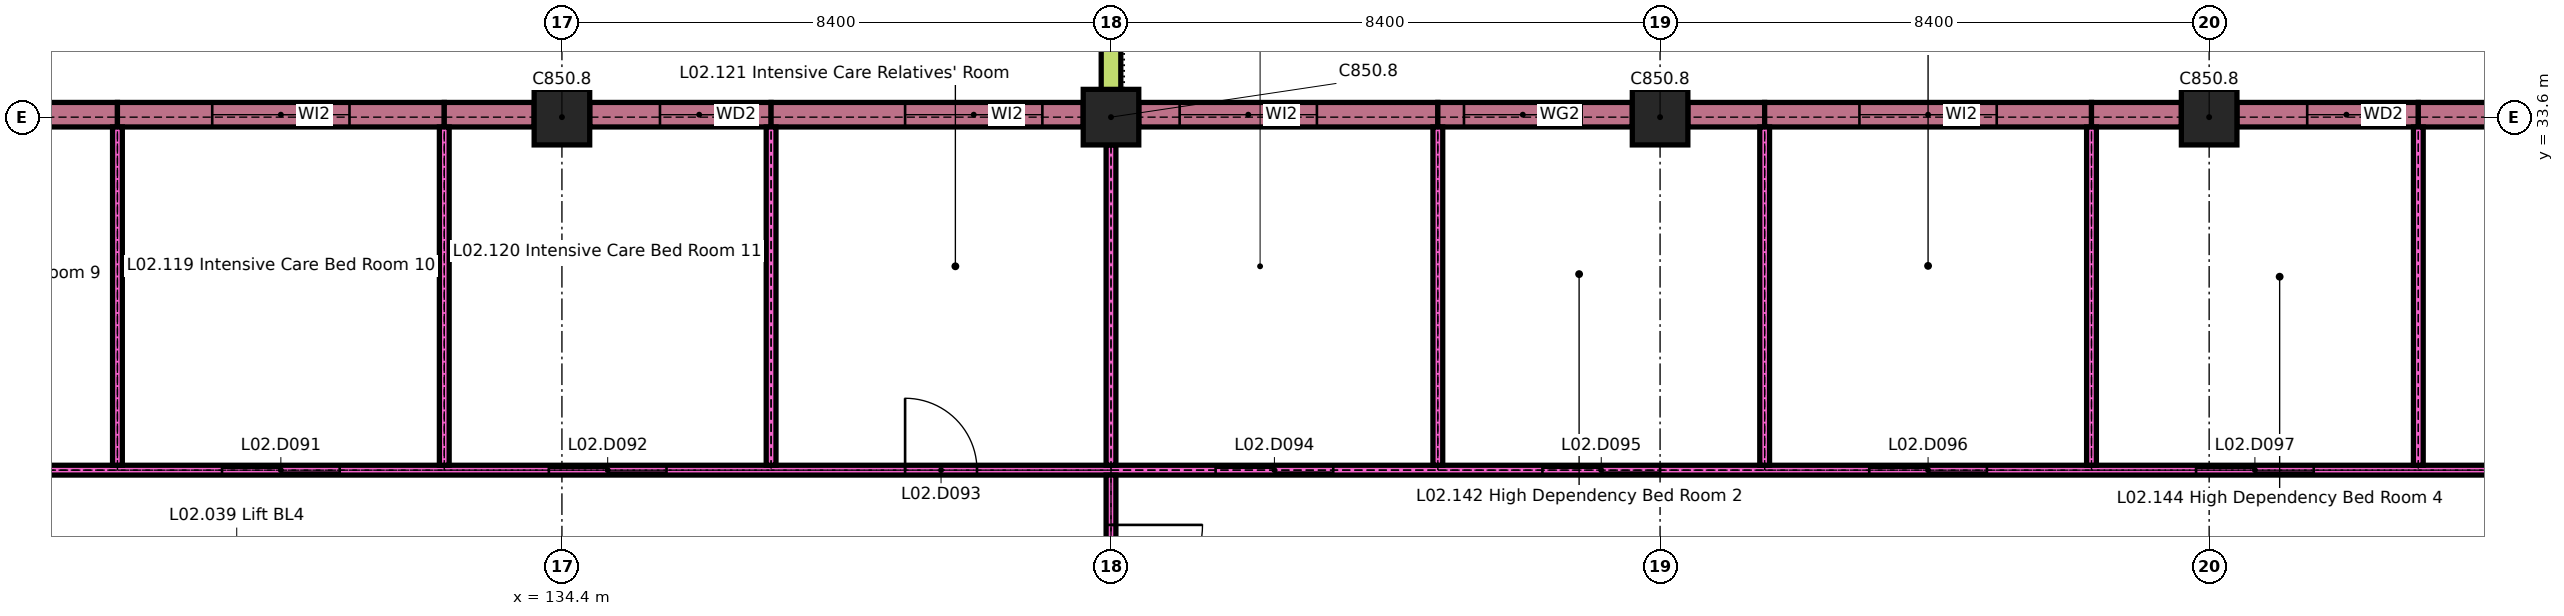
"""IFC4 building model, lengths in metres.
Left out: names, types, materials, properties, quantities, classifications, styles, units other than length and angle.
Written with IfcOpenShell. Run it as: python <this file> out.ifc"""

import sys

from ifc_helpers import new_model, si_unit, direction, frame, frame_2d, origin, origin_2d, place, context, subcontext, project, spatial, rectangle, extrude, element, fill, save


model = new_model("IFC4")
c1 = context("Model", 3, precision=1e-05, world=origin(), true_north=direction((0.0, 1.0)))
c2 = subcontext(c1, "Body", "Model", "MODEL_VIEW")
j1 = project(units=[si_unit("LENGTHUNIT", "METRE"), si_unit("PLANEANGLEUNIT", "RADIAN")], contexts=[c1])
p1 = place(None, origin())
s1 = spatial("IfcSite", under=j1, at=p1, CompositionType="ELEMENT")
p2 = place(p1, origin())
s2 = spatial("IfcBuilding", under=s1, at=p2, CompositionType="ELEMENT")
p3 = place(p2, frame((0.0, 0.0, 8.4)))
s3 = spatial("IfcBuildingStorey", under=s2, at=p3, CompositionType="ELEMENT", Elevation=8.4)
for number, where, z_axis, x_axis in (
    (1, (134.4, 33.6, 0.0), (0.0, 0.0, 1.0), (1.0, 0.0, 0.0)),
    (2, (142.8, 33.6, 0.0), (0.0, 0.0, 1.0), (1.0, 0.0, 0.0)),
    (3, (151.2, 33.6, 0.0), (0.0, 0.0, 1.0), (1.0, 0.0, 0.0)),
    (4, (159.6, 33.6, 0.0), (0.0, 0.0, 1.0), (1.0, 0.0, 0.0)),
):
    element("IfcColumn", number, at=place(p3, frame(where, z_axis=z_axis, x_axis=x_axis)), inside=s3, PredefinedType="COLUMN", context=c2, shape_type="SweptSolid", body=[
        extrude(rectangle(XDim=0.85, YDim=0.85, at=origin_2d()), origin(), (0.0, 0.0, 1.0), 4.2),
    ])
p4 = place(p3, frame((126.425, 33.637, 0.0), z_axis=(0.0, 0.0, 1.0), x_axis=(1.0, 0.0, 0.0)))
e5 = element("IfcWall", 5, at=p4, inside=s3, PredefinedType="SOLIDWALL", context=c2, shape_type="SweptSolid", body=[
    extrude(rectangle(XDim=1.175, YDim=0.375, at=frame_2d((0.587, 0.0))), origin(), (0.0, 0.0, 1.0), 3.9),
])
p5 = place(p3, frame((127.6, 33.637, 0.0), z_axis=(0.0, 0.0, 1.0), x_axis=(1.0, 0.0, 0.0)))
e6 = element("IfcWall", 6, at=p5, inside=s3, PredefinedType="SOLIDWALL", context=c2, shape_type="SweptSolid", body=[
    extrude(rectangle(XDim=5.0, YDim=0.375, at=frame_2d((2.5, 0.0))), origin(), (0.0, 0.0, 1.0), 3.9),
])
p6 = place(p5, frame((1.45, 0.0, 0.9)))
e7 = element("IfcOpeningElement", 7, at=p6, cuts=e6, PredefinedType="OPENING", context=c2, shape_type="SweptSolid", body=[
    extrude(rectangle(XDim=2.1, YDim=2.1, at=frame_2d((1.05, 1.05))), frame((0.0, 0.198, 0.0), z_axis=(0.0, -1.0, 0.0), x_axis=(1.0, 0.0, 0.0)), (0.0, 0.0, 1.0), 0.395),
])
p7 = place(p3, frame((132.6, 33.637, 0.0), z_axis=(0.0, 0.0, 1.0), x_axis=(1.0, 0.0, 0.0)))
e8 = element("IfcWall", 8, at=p7, inside=s3, PredefinedType="SOLIDWALL", context=c2, shape_type="SweptSolid", body=[
    extrude(rectangle(XDim=1.375, YDim=0.375, at=frame_2d((0.688, 0.0))), origin(), (0.0, 0.0, 1.0), 3.9),
])
p8 = place(p3, frame((134.825, 33.637, 0.0), z_axis=(0.0, 0.0, 1.0), x_axis=(1.0, 0.0, 0.0)))
e9 = element("IfcWall", 9, at=p8, inside=s3, PredefinedType="SOLIDWALL", context=c2, shape_type="SweptSolid", body=[
    extrude(rectangle(XDim=2.775, YDim=0.375, at=frame_2d((1.388, 0.0))), origin(), (0.0, 0.0, 1.0), 3.9),
])
p9 = place(p8, frame((1.075, 0.0, 0.9)))
e10 = element("IfcOpeningElement", 10, at=p9, cuts=e9, PredefinedType="OPENING", context=c2, shape_type="SweptSolid", body=[
    extrude(rectangle(XDim=1.2, YDim=2.1, at=frame_2d((0.6, 1.05))), frame((0.0, 0.198, 0.0), z_axis=(0.0, -1.0, 0.0), x_axis=(1.0, 0.0, 0.0)), (0.0, 0.0, 1.0), 0.395),
])
p10 = place(p3, frame((137.6, 33.637, 0.0), z_axis=(0.0, 0.0, 1.0), x_axis=(1.0, 0.0, 0.0)))
e11 = element("IfcWall", 11, at=p10, inside=s3, PredefinedType="SOLIDWALL", context=c2, shape_type="SweptSolid", body=[
    extrude(rectangle(XDim=4.775, YDim=0.375, at=frame_2d((2.387, 0.0))), origin(), (0.0, 0.0, 1.0), 3.9),
])
p11 = place(p10, frame((2.05, 0.0, 0.9)))
e12 = element("IfcOpeningElement", 12, at=p11, cuts=e11, PredefinedType="OPENING", context=c2, shape_type="SweptSolid", body=[
    extrude(rectangle(XDim=2.1, YDim=2.1, at=frame_2d((1.05, 1.05))), frame((0.0, 0.198, 0.0), z_axis=(0.0, -1.0, 0.0), x_axis=(1.0, 0.0, 0.0)), (0.0, 0.0, 1.0), 0.395),
])
p12 = place(p3, frame((143.225, 33.637, 0.0), z_axis=(0.0, 0.0, 1.0), x_axis=(1.0, 0.0, 0.0)))
e13 = element("IfcWall", 13, at=p12, inside=s3, PredefinedType="SOLIDWALL", context=c2, shape_type="SweptSolid", body=[
    extrude(rectangle(XDim=4.575, YDim=0.375, at=frame_2d((2.288, 0.0))), origin(), (0.0, 0.0, 1.0), 3.9),
])
p13 = place(p12, frame((0.625, 0.0, 0.9)))
e14 = element("IfcOpeningElement", 14, at=p13, cuts=e13, PredefinedType="OPENING", context=c2, shape_type="SweptSolid", body=[
    extrude(rectangle(XDim=2.1, YDim=2.1, at=frame_2d((1.05, 1.05))), frame((0.0, 0.198, 0.0), z_axis=(0.0, -1.0, 0.0), x_axis=(1.0, 0.0, 0.0)), (0.0, 0.0, 1.0), 0.395),
])
p14 = place(p3, frame((147.8, 33.637, 0.0), z_axis=(0.0, 0.0, 1.0), x_axis=(1.0, 0.0, 0.0)))
e15 = element("IfcWall", 15, at=p14, inside=s3, PredefinedType="SOLIDWALL", context=c2, shape_type="SweptSolid", body=[
    extrude(rectangle(XDim=2.975, YDim=0.375, at=frame_2d((1.487, 0.0))), origin(), (0.0, 0.0, 1.0), 3.9),
])
p15 = place(p14, frame((0.4, 0.0, 0.9)))
e16 = element("IfcOpeningElement", 16, at=p15, cuts=e15, PredefinedType="OPENING", context=c2, shape_type="SweptSolid", body=[
    extrude(rectangle(XDim=1.8, YDim=2.1, at=frame_2d((0.9, 1.05))), frame((0.0, 0.198, 0.0), z_axis=(0.0, -1.0, 0.0), x_axis=(1.0, 0.0, 0.0)), (0.0, 0.0, 1.0), 0.395),
])
p16 = place(p3, frame((151.625, 33.637, 0.0), z_axis=(0.0, 0.0, 1.0), x_axis=(1.0, 0.0, 0.0)))
e17 = element("IfcWall", 17, at=p16, inside=s3, PredefinedType="SOLIDWALL", context=c2, shape_type="SweptSolid", body=[
    extrude(rectangle(XDim=1.175, YDim=0.375, at=frame_2d((0.587, 0.0))), origin(), (0.0, 0.0, 1.0), 3.9),
])
p17 = place(p3, frame((152.8, 33.637, 0.0), z_axis=(0.0, 0.0, 1.0), x_axis=(1.0, 0.0, 0.0)))
e18 = element("IfcWall", 18, at=p17, inside=s3, PredefinedType="SOLIDWALL", context=c2, shape_type="SweptSolid", body=[
    extrude(rectangle(XDim=5.0, YDim=0.375, at=frame_2d((2.5, 0.0))), origin(), (0.0, 0.0, 1.0), 3.9),
])
p18 = place(p17, frame((1.45, 0.0, 0.9)))
e19 = element("IfcOpeningElement", 19, at=p18, cuts=e18, PredefinedType="OPENING", context=c2, shape_type="SweptSolid", body=[
    extrude(rectangle(XDim=2.1, YDim=2.1, at=frame_2d((1.05, 1.05))), frame((0.0, 0.198, 0.0), z_axis=(0.0, -1.0, 0.0), x_axis=(1.0, 0.0, 0.0)), (0.0, 0.0, 1.0), 0.395),
])
p19 = place(p3, frame((157.8, 33.637, 0.0), z_axis=(0.0, 0.0, 1.0), x_axis=(1.0, 0.0, 0.0)))
e20 = element("IfcWall", 20, at=p19, inside=s3, PredefinedType="SOLIDWALL", context=c2, shape_type="SweptSolid", body=[
    extrude(rectangle(XDim=1.375, YDim=0.375, at=frame_2d((0.688, 0.0))), origin(), (0.0, 0.0, 1.0), 3.9),
])
p20 = place(p3, frame((160.025, 33.637, 0.0), z_axis=(0.0, 0.0, 1.0), x_axis=(1.0, 0.0, 0.0)))
e21 = element("IfcWall", 21, at=p20, inside=s3, PredefinedType="SOLIDWALL", context=c2, shape_type="SweptSolid", body=[
    extrude(rectangle(XDim=2.775, YDim=0.375, at=frame_2d((1.388, 0.0))), origin(), (0.0, 0.0, 1.0), 3.9),
])
p21 = place(p20, frame((1.075, 0.0, 0.9)))
e22 = element("IfcOpeningElement", 22, at=p21, cuts=e21, PredefinedType="OPENING", context=c2, shape_type="SweptSolid", body=[
    extrude(rectangle(XDim=1.2, YDim=2.1, at=frame_2d((0.6, 1.05))), frame((0.0, 0.198, 0.0), z_axis=(0.0, -1.0, 0.0), x_axis=(1.0, 0.0, 0.0)), (0.0, 0.0, 1.0), 0.395),
])
p22 = place(p3, frame((162.8, 33.637, 0.0), z_axis=(0.0, 0.0, 1.0), x_axis=(1.0, 0.0, 0.0)))
e23 = element("IfcWall", 23, at=p22, inside=s3, PredefinedType="SOLIDWALL", context=c2, shape_type="SweptSolid", body=[
    extrude(rectangle(XDim=4.775, YDim=0.375, at=frame_2d((2.387, 0.0))), origin(), (0.0, 0.0, 1.0), 3.9),
])
p23 = place(p22, frame((2.05, 0.0, 0.9)))
e24 = element("IfcOpeningElement", 24, at=p23, cuts=e23, PredefinedType="OPENING", context=c2, shape_type="SweptSolid", body=[
    extrude(rectangle(XDim=2.1, YDim=2.1, at=frame_2d((1.05, 1.05))), frame((0.0, 0.198, 0.0), z_axis=(0.0, -1.0, 0.0), x_axis=(1.0, 0.0, 0.0)), (0.0, 0.0, 1.0), 0.395),
])
p24 = place(p3, frame((142.8, 75.3, 0.0), z_axis=(0.0, 0.0, 1.0), x_axis=(0.0, -1.0, 0.0)))
e25 = element("IfcWall", 25, at=p24, inside=s3, PredefinedType="PARAPET", context=c2, shape_type="SweptSolid", body=[
    extrude(rectangle(XDim=41.55, YDim=0.3, at=frame_2d((20.775, 0.0))), origin(), (0.0, 0.0, 1.0), 1.2),
])
p25 = place(p3, frame((117.7, 28.2, 0.0), z_axis=(0.0, 0.0, 1.0), x_axis=(1.0, 0.0, 0.0)))
e26 = element("IfcWall", 26, at=p25, inside=s3, PredefinedType="PARTITIONING", context=c2, shape_type="SweptSolid", body=[
    extrude(rectangle(XDim=50.15, YDim=0.15, at=frame_2d((25.075, 0.0))), origin(), (0.0, 0.0, 1.0), 4.2),
])
p26 = place(p25, frame((1.55, 0.0, 0.0)))
e27 = element("IfcOpeningElement", 27, at=p26, cuts=e26, PredefinedType="OPENING", context=c2, shape_type="SweptSolid", body=[
    extrude(rectangle(XDim=1.8, YDim=2.4, at=frame_2d((0.9, 1.2))), frame((0.0, 0.085, 0.0), z_axis=(0.0, -1.0, 0.0), x_axis=(1.0, 0.0, 0.0)), (0.0, 0.0, 1.0), 0.17),
])
p27 = place(p25, frame((6.5, 0.0, 0.0)))
e28 = element("IfcOpeningElement", 28, at=p27, cuts=e26, PredefinedType="OPENING", context=c2, shape_type="SweptSolid", body=[
    extrude(rectangle(XDim=1.8, YDim=2.4, at=frame_2d((0.9, 1.2))), frame((0.0, 0.085, 0.0), z_axis=(0.0, -1.0, 0.0), x_axis=(1.0, 0.0, 0.0)), (0.0, 0.0, 1.0), 0.17),
])
p28 = place(p25, frame((11.5, 0.0, 0.0)))
e29 = element("IfcOpeningElement", 29, at=p28, cuts=e26, PredefinedType="OPENING", context=c2, shape_type="SweptSolid", body=[
    extrude(rectangle(XDim=1.8, YDim=2.4, at=frame_2d((0.9, 1.2))), frame((0.0, 0.085, 0.0), z_axis=(0.0, -1.0, 0.0), x_axis=(1.0, 0.0, 0.0)), (0.0, 0.0, 1.0), 0.17),
])
p29 = place(p25, frame((16.5, 0.0, 0.0)))
e30 = element("IfcOpeningElement", 30, at=p29, cuts=e26, PredefinedType="OPENING", context=c2, shape_type="SweptSolid", body=[
    extrude(rectangle(XDim=1.8, YDim=2.4, at=frame_2d((0.9, 1.2))), frame((0.0, 0.085, 0.0), z_axis=(0.0, -1.0, 0.0), x_axis=(1.0, 0.0, 0.0)), (0.0, 0.0, 1.0), 0.17),
])
p30 = place(p25, frame((21.95, 0.0, 0.0)))
e31 = element("IfcOpeningElement", 31, at=p30, cuts=e26, PredefinedType="OPENING", context=c2, shape_type="SweptSolid", body=[
    extrude(rectangle(XDim=1.1, YDim=2.1, at=frame_2d((0.55, 1.05))), frame((0.0, 0.085, 0.0), z_axis=(0.0, -1.0, 0.0), x_axis=(1.0, 0.0, 0.0)), (0.0, 0.0, 1.0), 0.17),
])
p31 = place(p25, frame((26.7, 0.0, 0.0)))
e32 = element("IfcOpeningElement", 32, at=p31, cuts=e26, PredefinedType="OPENING", context=c2, shape_type="SweptSolid", body=[
    extrude(rectangle(XDim=1.8, YDim=2.4, at=frame_2d((0.9, 1.2))), frame((0.0, 0.085, 0.0), z_axis=(0.0, -1.0, 0.0), x_axis=(1.0, 0.0, 0.0)), (0.0, 0.0, 1.0), 0.17),
])
p32 = place(p25, frame((31.7, 0.0, 0.0)))
e33 = element("IfcOpeningElement", 33, at=p32, cuts=e26, PredefinedType="OPENING", context=c2, shape_type="SweptSolid", body=[
    extrude(rectangle(XDim=1.8, YDim=2.4, at=frame_2d((0.9, 1.2))), frame((0.0, 0.085, 0.0), z_axis=(0.0, -1.0, 0.0), x_axis=(1.0, 0.0, 0.0)), (0.0, 0.0, 1.0), 0.17),
])
p33 = place(p25, frame((36.7, 0.0, 0.0)))
e34 = element("IfcOpeningElement", 34, at=p33, cuts=e26, PredefinedType="OPENING", context=c2, shape_type="SweptSolid", body=[
    extrude(rectangle(XDim=1.8, YDim=2.4, at=frame_2d((0.9, 1.2))), frame((0.0, 0.085, 0.0), z_axis=(0.0, -1.0, 0.0), x_axis=(1.0, 0.0, 0.0)), (0.0, 0.0, 1.0), 0.17),
])
p34 = place(p25, frame((41.7, 0.0, 0.0)))
e35 = element("IfcOpeningElement", 35, at=p34, cuts=e26, PredefinedType="OPENING", context=c2, shape_type="SweptSolid", body=[
    extrude(rectangle(XDim=1.8, YDim=2.4, at=frame_2d((0.9, 1.2))), frame((0.0, 0.085, 0.0), z_axis=(0.0, -1.0, 0.0), x_axis=(1.0, 0.0, 0.0)), (0.0, 0.0, 1.0), 0.17),
])
p35 = place(p25, frame((46.725, 0.0, 0.0)))
e36 = element("IfcOpeningElement", 36, at=p35, cuts=e26, PredefinedType="OPENING", context=c2, shape_type="SweptSolid", body=[
    extrude(rectangle(XDim=1.8, YDim=2.4, at=frame_2d((0.9, 1.2))), frame((0.0, 0.085, 0.0), z_axis=(0.0, -1.0, 0.0), x_axis=(1.0, 0.0, 0.0)), (0.0, 0.0, 1.0), 0.17),
])
for number, where, z_axis, x_axis in (
    (37, (127.6, 28.275, 0.0), (0.0, 0.0, 1.0), (0.0, 1.0, 0.0)),
    (38, (132.6, 28.275, 0.0), (0.0, 0.0, 1.0), (0.0, 1.0, 0.0)),
    (39, (137.6, 28.275, 0.0), (0.0, 0.0, 1.0), (0.0, 1.0, 0.0)),
):
    element("IfcWall", number, at=place(p3, frame(where, z_axis=z_axis, x_axis=x_axis)), inside=s3, PredefinedType="PARTITIONING", context=c2, shape_type="SweptSolid", body=[
        extrude(rectangle(XDim=5.175, YDim=0.15, at=frame_2d((2.587, 0.0))), origin(), (0.0, 0.0, 1.0), 4.2),
    ])
p36 = place(p3, frame((142.8, 25.2, 0.0), z_axis=(0.0, 0.0, 1.0), x_axis=(0.0, 1.0, 0.0)))
e40 = element("IfcWall", 40, at=p36, inside=s3, PredefinedType="PARTITIONING", context=c2, shape_type="SweptSolid", body=[
    extrude(rectangle(XDim=2.925, YDim=0.15, at=frame_2d((1.462, 0.0))), origin(), (0.0, 0.0, 1.0), 4.2),
])
p37 = place(p36, frame((0.762, 0.0, 0.0)))
e41 = element("IfcOpeningElement", 41, at=p37, cuts=e40, PredefinedType="OPENING", context=c2, shape_type="SweptSolid", body=[
    extrude(rectangle(XDim=1.4, YDim=2.1, at=frame_2d((0.7, 1.05))), frame((0.0, 0.085, 0.0), z_axis=(0.0, -1.0, 0.0), x_axis=(1.0, 0.0, 0.0)), (0.0, 0.0, 1.0), 0.17),
])
p38 = place(p3, frame((142.8, 28.275, 0.0), z_axis=(0.0, 0.0, 1.0), x_axis=(0.0, 1.0, 0.0)))
e42 = element("IfcWall", 42, at=p38, inside=s3, PredefinedType="PARTITIONING", context=c2, shape_type="SweptSolid", body=[
    extrude(rectangle(XDim=4.9, YDim=0.15, at=frame_2d((2.45, 0.0))), origin(), (0.0, 0.0, 1.0), 4.2),
])
for number, where, z_axis, x_axis in (
    (43, (147.8, 28.275, 0.0), (0.0, 0.0, 1.0), (0.0, 1.0, 0.0)),
    (44, (152.8, 28.275, 0.0), (0.0, 0.0, 1.0), (0.0, 1.0, 0.0)),
    (45, (157.8, 28.275, 0.0), (0.0, 0.0, 1.0), (0.0, 1.0, 0.0)),
    (46, (162.8, 28.275, 0.0), (0.0, 0.0, 1.0), (0.0, 1.0, 0.0)),
):
    element("IfcWall", number, at=place(p3, frame(where, z_axis=z_axis, x_axis=x_axis)), inside=s3, PredefinedType="PARTITIONING", context=c2, shape_type="SweptSolid", body=[
        extrude(rectangle(XDim=5.175, YDim=0.15, at=frame_2d((2.587, 0.0))), origin(), (0.0, 0.0, 1.0), 4.2),
    ])
p39 = place(p6, origin())
e47 = element("IfcWindow", 47, at=p39, inside=s3, PartitioningType="SINGLE_PANEL", PredefinedType="WINDOW", context=c2, shape_type="SweptSolid", body=[
    extrude(rectangle(XDim=2.1, YDim=2.1, at=frame_2d((1.05, 1.05))), frame((0.0, 0.045, 0.0), z_axis=(0.0, -1.0, 0.0), x_axis=(1.0, 0.0, 0.0)), (0.0, 0.0, 1.0), 0.09),
])
fill(e7, e47)
p40 = place(p9, origin())
e48 = element("IfcWindow", 48, at=p40, inside=s3, PartitioningType="SINGLE_PANEL", PredefinedType="WINDOW", context=c2, shape_type="SweptSolid", body=[
    extrude(rectangle(XDim=1.2, YDim=2.1, at=frame_2d((0.6, 1.05))), frame((0.0, 0.03, 0.0), z_axis=(0.0, -1.0, 0.0), x_axis=(1.0, 0.0, 0.0)), (0.0, 0.0, 1.0), 0.06),
])
fill(e10, e48)
p41 = place(p11, origin())
e49 = element("IfcWindow", 49, at=p41, inside=s3, PartitioningType="SINGLE_PANEL", PredefinedType="WINDOW", context=c2, shape_type="SweptSolid", body=[
    extrude(rectangle(XDim=2.1, YDim=2.1, at=frame_2d((1.05, 1.05))), frame((0.0, 0.045, 0.0), z_axis=(0.0, -1.0, 0.0), x_axis=(1.0, 0.0, 0.0)), (0.0, 0.0, 1.0), 0.09),
])
fill(e12, e49)
p42 = place(p13, origin())
e50 = element("IfcWindow", 50, at=p42, inside=s3, PartitioningType="SINGLE_PANEL", PredefinedType="WINDOW", context=c2, shape_type="SweptSolid", body=[
    extrude(rectangle(XDim=2.1, YDim=2.1, at=frame_2d((1.05, 1.05))), frame((0.0, 0.045, 0.0), z_axis=(0.0, -1.0, 0.0), x_axis=(1.0, 0.0, 0.0)), (0.0, 0.0, 1.0), 0.09),
])
fill(e14, e50)
p43 = place(p15, origin())
e51 = element("IfcWindow", 51, at=p43, inside=s3, PartitioningType="DOUBLE_PANEL_VERTICAL", PredefinedType="WINDOW", context=c2, shape_type="SweptSolid", body=[
    extrude(rectangle(XDim=1.8, YDim=2.1, at=frame_2d((0.9, 1.05))), frame((0.0, 0.03, 0.0), z_axis=(0.0, -1.0, 0.0), x_axis=(1.0, 0.0, 0.0)), (0.0, 0.0, 1.0), 0.06),
])
fill(e16, e51)
p44 = place(p18, origin())
e52 = element("IfcWindow", 52, at=p44, inside=s3, PartitioningType="SINGLE_PANEL", PredefinedType="WINDOW", context=c2, shape_type="SweptSolid", body=[
    extrude(rectangle(XDim=2.1, YDim=2.1, at=frame_2d((1.05, 1.05))), frame((0.0, 0.045, 0.0), z_axis=(0.0, -1.0, 0.0), x_axis=(1.0, 0.0, 0.0)), (0.0, 0.0, 1.0), 0.09),
])
fill(e19, e52)
p45 = place(p21, origin())
e53 = element("IfcWindow", 53, at=p45, inside=s3, PartitioningType="SINGLE_PANEL", PredefinedType="WINDOW", context=c2, shape_type="SweptSolid", body=[
    extrude(rectangle(XDim=1.2, YDim=2.1, at=frame_2d((0.6, 1.05))), frame((0.0, 0.03, 0.0), z_axis=(0.0, -1.0, 0.0), x_axis=(1.0, 0.0, 0.0)), (0.0, 0.0, 1.0), 0.06),
])
fill(e22, e53)
p46 = place(p28, origin())
e54 = element("IfcDoor", 54, at=p46, inside=s3, OperationType="DOUBLE_DOOR_SLIDING", PredefinedType="DOOR", context=c2, shape_type="SweptSolid", body=[
    extrude(rectangle(XDim=1.8, YDim=2.4, at=frame_2d((0.9, 1.2))), frame((0.0, 0.035, 0.0), z_axis=(0.0, -1.0, 0.0), x_axis=(1.0, 0.0, 0.0)), (0.0, 0.0, 1.0), 0.07),
])
fill(e29, e54)
p47 = place(p29, origin())
e55 = element("IfcDoor", 55, at=p47, inside=s3, OperationType="DOUBLE_DOOR_SLIDING", PredefinedType="DOOR", context=c2, shape_type="SweptSolid", body=[
    extrude(rectangle(XDim=1.8, YDim=2.4, at=frame_2d((0.9, 1.2))), frame((0.0, 0.035, 0.0), z_axis=(0.0, -1.0, 0.0), x_axis=(1.0, 0.0, 0.0)), (0.0, 0.0, 1.0), 0.07),
])
fill(e30, e55)
p48 = place(p30, origin())
e56 = element("IfcDoor", 56, at=p48, inside=s3, OperationType="SINGLE_SWING_RIGHT", PredefinedType="DOOR", context=c2, shape_type="SweptSolid", body=[
    extrude(rectangle(XDim=1.1, YDim=2.1, at=frame_2d((0.55, 1.05))), frame((0.0, 0.025, 0.0), z_axis=(0.0, -1.0, 0.0), x_axis=(1.0, 0.0, 0.0)), (0.0, 0.0, 1.0), 0.05),
])
fill(e31, e56)
p49 = place(p31, origin())
e57 = element("IfcDoor", 57, at=p49, inside=s3, OperationType="DOUBLE_DOOR_SLIDING", PredefinedType="DOOR", context=c2, shape_type="SweptSolid", body=[
    extrude(rectangle(XDim=1.8, YDim=2.4, at=frame_2d((0.9, 1.2))), frame((0.0, 0.035, 0.0), z_axis=(0.0, -1.0, 0.0), x_axis=(1.0, 0.0, 0.0)), (0.0, 0.0, 1.0), 0.07),
])
fill(e32, e57)
p50 = place(p32, origin())
e58 = element("IfcDoor", 58, at=p50, inside=s3, OperationType="DOUBLE_DOOR_SLIDING", PredefinedType="DOOR", context=c2, shape_type="SweptSolid", body=[
    extrude(rectangle(XDim=1.8, YDim=2.4, at=frame_2d((0.9, 1.2))), frame((0.0, 0.035, 0.0), z_axis=(0.0, -1.0, 0.0), x_axis=(1.0, 0.0, 0.0)), (0.0, 0.0, 1.0), 0.07),
])
fill(e33, e58)
p51 = place(p33, origin())
e59 = element("IfcDoor", 59, at=p51, inside=s3, OperationType="DOUBLE_DOOR_SLIDING", PredefinedType="DOOR", context=c2, shape_type="SweptSolid", body=[
    extrude(rectangle(XDim=1.8, YDim=2.4, at=frame_2d((0.9, 1.2))), frame((0.0, 0.035, 0.0), z_axis=(0.0, -1.0, 0.0), x_axis=(1.0, 0.0, 0.0)), (0.0, 0.0, 1.0), 0.07),
])
fill(e34, e59)
p52 = place(p34, origin())
e60 = element("IfcDoor", 60, at=p52, inside=s3, OperationType="DOUBLE_DOOR_SLIDING", PredefinedType="DOOR", context=c2, shape_type="SweptSolid", body=[
    extrude(rectangle(XDim=1.8, YDim=2.4, at=frame_2d((0.9, 1.2))), frame((0.0, 0.035, 0.0), z_axis=(0.0, -1.0, 0.0), x_axis=(1.0, 0.0, 0.0)), (0.0, 0.0, 1.0), 0.07),
])
fill(e35, e60)
p53 = place(p37, origin())
e61 = element("IfcDoor", 61, at=p53, inside=s3, OperationType="SINGLE_SWING_RIGHT", PredefinedType="DOOR", context=c2, shape_type="SweptSolid", body=[
    extrude(rectangle(XDim=1.4, YDim=2.1, at=frame_2d((0.7, 1.05))), frame((0.0, 0.025, 0.0), z_axis=(0.0, -1.0, 0.0), x_axis=(1.0, 0.0, 0.0)), (0.0, 0.0, 1.0), 0.05),
])
fill(e41, e61)
save(model, sys.argv[1])
